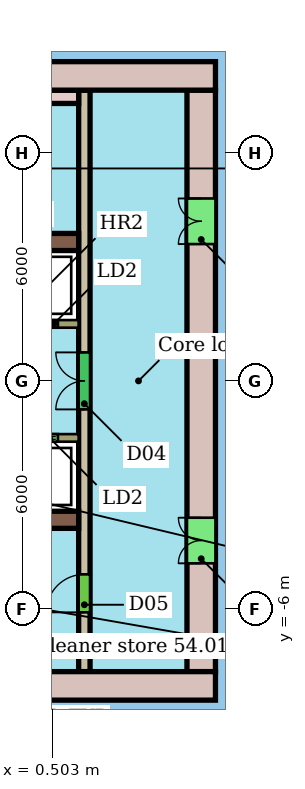
"""IFC4 building model, lengths in metres.
Left out: names, types, materials, properties, quantities, classifications, styles, units other than length and angle.
Written with IfcOpenShell. Run it as: python <this file> out.ifc"""

import sys

from ifc_helpers import new_model, si_unit, direction, frame, frame_2d, origin, place, context, subcontext, project, spatial, rectangle, extrude, element, fill, save


model = new_model("IFC4")
c1 = context("Model", 3, precision=1e-05, world=origin(), true_north=direction((0.0, 1.0)))
c2 = subcontext(c1, "Body", "Model", "MODEL_VIEW")
j1 = project(units=[si_unit("LENGTHUNIT", "METRE"), si_unit("PLANEANGLEUNIT", "RADIAN")], contexts=[c1])
p1 = place(None, origin())
s1 = spatial("IfcSite", under=j1, at=p1, CompositionType="ELEMENT")
p2 = place(p1, origin())
s2 = spatial("IfcBuilding", under=s1, at=p2, CompositionType="ELEMENT")
p3 = place(p2, frame((0.0, 0.0, 220.9)))
s3 = spatial("IfcBuildingStorey", under=s2, at=p3, CompositionType="ELEMENT", Elevation=220.9)
p4 = place(p3, frame((4.8, 8.025, 0.0), z_axis=(0.0, 0.0, 1.0), x_axis=(-1.0, 0.0, 0.0)))
e1 = element("IfcWall", 1, at=p4, inside=s3, PredefinedType="SHEAR", context=c2, shape_type="SweptSolid", body=[
    extrude(rectangle(XDim=10.8, YDim=0.75, at=frame_2d((5.4, 0.0))), origin(), (0.0, 0.0, 1.0), 3.3),
])
p5 = place(p4, frame((4.4, 0.0, 0.0)))
e2 = element("IfcOpeningElement", 2, at=p5, cuts=e1, PredefinedType="OPENING", context=c2, shape_type="SweptSolid", body=[
    extrude(rectangle(XDim=1.2, YDim=2.1, at=frame_2d((0.6, 1.05))), frame((0.0, 0.385, 0.0), z_axis=(0.0, -1.0, 0.0), x_axis=(1.0, 0.0, 0.0)), (0.0, 0.0, 1.0), 0.77),
])
p6 = place(p3, frame((-16.8, -8.025, 0.0), z_axis=(0.0, 0.0, 1.0), x_axis=(1.0, 0.0, 0.0)))
e3 = element("IfcWall", 3, at=p6, inside=s3, PredefinedType="SHEAR", context=c2, shape_type="SweptSolid", body=[
    extrude(rectangle(XDim=21.6, YDim=0.75, at=frame_2d((10.8, 0.0))), origin(), (0.0, 0.0, 1.0), 3.3),
])
p7 = place(p6, frame((4.8, 0.0, 0.0)))
e4 = element("IfcOpeningElement", 4, at=p7, cuts=e3, PredefinedType="OPENING", context=c2, shape_type="SweptSolid", body=[
    extrude(rectangle(XDim=1.2, YDim=2.1, at=frame_2d((0.6, 1.05))), frame((0.0, 0.385, 0.0), z_axis=(0.0, -1.0, 0.0), x_axis=(1.0, 0.0, 0.0)), (0.0, 0.0, 1.0), 0.77),
])
p8 = place(p3, frame((4.425, -7.65, 0.0), z_axis=(0.0, 0.0, 1.0), x_axis=(0.0, 1.0, 0.0)))
e5 = element("IfcWall", 5, at=p8, inside=s3, PredefinedType="SHEAR", context=c2, shape_type="SweptSolid", body=[
    extrude(rectangle(XDim=15.3, YDim=0.75, at=frame_2d((7.65, 0.0))), origin(), (0.0, 0.0, 1.0), 3.3),
])
p9 = place(p8, frame((2.85, 0.0, 0.0)))
e6 = element("IfcOpeningElement", 6, at=p9, cuts=e5, PredefinedType="OPENING", context=c2, shape_type="SweptSolid", body=[
    extrude(rectangle(XDim=1.2, YDim=2.1, at=frame_2d((0.6, 1.05))), frame((0.0, 0.385, 0.0), z_axis=(0.0, -1.0, 0.0), x_axis=(1.0, 0.0, 0.0)), (0.0, 0.0, 1.0), 0.77),
])
p10 = place(p8, frame((11.25, 0.0, 0.0)))
e7 = element("IfcOpeningElement", 7, at=p10, cuts=e5, PredefinedType="OPENING", context=c2, shape_type="SweptSolid", body=[
    extrude(rectangle(XDim=1.2, YDim=2.1, at=frame_2d((0.6, 1.05))), frame((0.0, 0.385, 0.0), z_axis=(0.0, -1.0, 0.0), x_axis=(1.0, 0.0, 0.0)), (0.0, 0.0, 1.0), 0.77),
])
for number, where, z_axis, x_axis in (
    (8, (-6.0, 3.655, 0.0), (0.0, 0.0, 1.0), (1.0, 0.0, 0.0)),
    (9, (-6.0, -3.655, 0.0), (0.0, 0.0, 1.0), (1.0, 0.0, 0.0)),
):
    element("IfcWall", number, at=place(p3, frame(where, z_axis=z_axis, x_axis=x_axis)), inside=s3, PredefinedType="SHEAR", context=c2, shape_type="SweptSolid", body=[
        extrude(rectangle(XDim=7.2, YDim=0.45, at=frame_2d((3.6, 0.0))), origin(), (0.0, 0.0, 1.0), 3.3),
    ])
p11 = place(p3, frame((1.35, -7.65, 0.0), z_axis=(0.0, 0.0, 1.0), x_axis=(0.0, 1.0, 0.0)))
e10 = element("IfcWall", 10, at=p11, inside=s3, PredefinedType="SHEAR", context=c2, shape_type="SweptSolid", body=[
    extrude(rectangle(XDim=15.3, YDim=0.3, at=frame_2d((7.65, 0.0))), origin(), (0.0, 0.0, 1.0), 3.3),
])
p12 = place(p11, frame((1.56, 0.0, 0.0)))
e11 = element("IfcOpeningElement", 11, at=p12, cuts=e10, PredefinedType="OPENING", context=c2, shape_type="SweptSolid", body=[
    extrude(rectangle(XDim=1.0, YDim=2.1, at=frame_2d((0.5, 1.05))), frame((0.0, 0.16, 0.0), z_axis=(0.0, -1.0, 0.0), x_axis=(1.0, 0.0, 0.0)), (0.0, 0.0, 1.0), 0.32),
])
p13 = place(p11, frame((6.9, 0.0, 0.0)))
e12 = element("IfcOpeningElement", 12, at=p13, cuts=e10, PredefinedType="OPENING", context=c2, shape_type="SweptSolid", body=[
    extrude(rectangle(XDim=1.5, YDim=2.1, at=frame_2d((0.75, 1.05))), frame((0.0, 0.16, 0.0), z_axis=(0.0, -1.0, 0.0), x_axis=(1.0, 0.0, 0.0)), (0.0, 0.0, 1.0), 0.32),
])
p14 = place(p3, frame((-13.2, 1.5, 0.0), z_axis=(0.0, 0.0, 1.0), x_axis=(1.0, 0.0, 0.0)))
e13 = element("IfcWall", 13, at=p14, inside=s3, PredefinedType="SHEAR", context=c2, shape_type="SweptSolid", body=[
    extrude(rectangle(XDim=14.4, YDim=0.2, at=frame_2d((7.2, 0.0))), origin(), (0.0, 0.0, 1.0), 3.3),
])
p15 = place(p14, frame((10.312, 0.0, 0.0)))
e14 = element("IfcOpeningElement", 14, at=p15, cuts=e13, PredefinedType="OPENING", context=c2, shape_type="SweptSolid", body=[
    extrude(rectangle(XDim=1.1, YDim=2.1, at=frame_2d((0.55, 1.05))), frame((0.0, 0.11, 0.0), z_axis=(0.0, -1.0, 0.0), x_axis=(1.0, 0.0, 0.0)), (0.0, 0.0, 1.0), 0.22),
])
p16 = place(p14, frame((12.754, 0.0, 0.0)))
e15 = element("IfcOpeningElement", 15, at=p16, cuts=e13, PredefinedType="OPENING", context=c2, shape_type="SweptSolid", body=[
    extrude(rectangle(XDim=1.1, YDim=2.1, at=frame_2d((0.55, 1.05))), frame((0.0, 0.11, 0.0), z_axis=(0.0, -1.0, 0.0), x_axis=(1.0, 0.0, 0.0)), (0.0, 0.0, 1.0), 0.22),
])
p17 = place(p14, frame((0.15, 0.0, 0.0)))
e16 = element("IfcOpeningElement", 16, at=p17, cuts=e13, PredefinedType="OPENING", context=c2, shape_type="SweptSolid", body=[
    extrude(rectangle(XDim=0.9, YDim=2.1, at=frame_2d((0.45, 1.05))), frame((0.0, 0.11, 0.0), z_axis=(0.0, -1.0, 0.0), x_axis=(1.0, 0.0, 0.0)), (0.0, 0.0, 1.0), 0.22),
])
p18 = place(p14, frame((4.222, 0.0, 0.0)))
e17 = element("IfcOpeningElement", 17, at=p18, cuts=e13, PredefinedType="OPENING", context=c2, shape_type="SweptSolid", body=[
    extrude(rectangle(XDim=0.9, YDim=2.1, at=frame_2d((0.45, 1.05))), frame((0.0, 0.11, 0.0), z_axis=(0.0, -1.0, 0.0), x_axis=(1.0, 0.0, 0.0)), (0.0, 0.0, 1.0), 0.22),
])
p19 = place(p14, frame((8.367, 0.0, 0.0)))
e18 = element("IfcOpeningElement", 18, at=p19, cuts=e13, PredefinedType="OPENING", context=c2, shape_type="SweptSolid", body=[
    extrude(rectangle(XDim=1.0, YDim=2.1, at=frame_2d((0.5, 1.05))), frame((0.0, 0.11, 0.0), z_axis=(0.0, -1.0, 0.0), x_axis=(1.0, 0.0, 0.0)), (0.0, 0.0, 1.0), 0.22),
])
p20 = place(p3, frame((1.2, -1.5, 0.0), z_axis=(0.0, 0.0, 1.0), x_axis=(-1.0, 0.0, 0.0)))
e19 = element("IfcWall", 19, at=p20, inside=s3, PredefinedType="SHEAR", context=c2, shape_type="SweptSolid", body=[
    extrude(rectangle(XDim=14.4, YDim=0.2, at=frame_2d((7.2, 0.0))), origin(), (0.0, 0.0, 1.0), 3.3),
])
p21 = place(p20, frame((7.821, 0.0, 0.0)))
e20 = element("IfcOpeningElement", 20, at=p21, cuts=e19, PredefinedType="OPENING", context=c2, shape_type="SweptSolid", body=[
    extrude(rectangle(XDim=1.2, YDim=2.1, at=frame_2d((0.6, 1.05))), frame((0.0, 0.11, 0.0), z_axis=(0.0, -1.0, 0.0), x_axis=(1.0, 0.0, 0.0)), (0.0, 0.0, 1.0), 0.22),
])
p22 = place(p20, frame((0.546, 0.0, 0.0)))
e21 = element("IfcOpeningElement", 21, at=p22, cuts=e19, PredefinedType="OPENING", context=c2, shape_type="SweptSolid", body=[
    extrude(rectangle(XDim=1.1, YDim=2.1, at=frame_2d((0.55, 1.05))), frame((0.0, 0.11, 0.0), z_axis=(0.0, -1.0, 0.0), x_axis=(1.0, 0.0, 0.0)), (0.0, 0.0, 1.0), 0.22),
])
p23 = place(p20, frame((5.632, 0.0, 0.0)))
e22 = element("IfcOpeningElement", 22, at=p23, cuts=e19, PredefinedType="OPENING", context=c2, shape_type="SweptSolid", body=[
    extrude(rectangle(XDim=1.0, YDim=2.1, at=frame_2d((0.5, 1.05))), frame((0.0, 0.11, 0.0), z_axis=(0.0, -1.0, 0.0), x_axis=(1.0, 0.0, 0.0)), (0.0, 0.0, 1.0), 0.22),
])
p24 = place(p20, frame((2.592, 0.0, 0.0)))
e23 = element("IfcOpeningElement", 23, at=p24, cuts=e19, PredefinedType="OPENING", context=c2, shape_type="SweptSolid", body=[
    extrude(rectangle(XDim=1.0, YDim=2.1, at=frame_2d((0.5, 1.05))), frame((0.0, 0.11, 0.0), z_axis=(0.0, -1.0, 0.0), x_axis=(1.0, 0.0, 0.0)), (0.0, 0.0, 1.0), 0.22),
])
p25 = place(p3, frame((0.4, 7.475, 0.0), z_axis=(0.0, 0.0, 1.0), x_axis=(1.0, 0.0, 0.0)))
e24 = element("IfcWall", 24, at=p25, inside=s3, PredefinedType="SHEAR", context=c2, shape_type="SweptSolid", body=[
    extrude(rectangle(XDim=0.8, YDim=0.35, at=frame_2d((0.4, 0.0))), origin(), (0.0, 0.0, 1.0), 3.3),
])
p26 = place(p9, origin())
e25 = element("IfcDoor", 25, at=p26, inside=s3, OperationType="DOUBLE_DOOR_SINGLE_SWING", PredefinedType="NOTDEFINED", context=c2, shape_type="SweptSolid", body=[
    extrude(rectangle(XDim=1.2, YDim=2.1, at=frame_2d((0.6, 1.05))), frame((0.0, 0.025, 0.0), z_axis=(0.0, -1.0, 0.0), x_axis=(1.0, 0.0, 0.0)), (0.0, 0.0, 1.0), 0.05),
])
fill(e6, e25)
p27 = place(p10, origin())
e26 = element("IfcDoor", 26, at=p27, inside=s3, OperationType="DOUBLE_DOOR_SINGLE_SWING", PredefinedType="NOTDEFINED", context=c2, shape_type="SweptSolid", body=[
    extrude(rectangle(XDim=1.2, YDim=2.1, at=frame_2d((0.6, 1.05))), frame((0.0, 0.025, 0.0), z_axis=(0.0, -1.0, 0.0), x_axis=(1.0, 0.0, 0.0)), (0.0, 0.0, 1.0), 0.05),
])
fill(e7, e26)
p28 = place(p12, origin())
e27 = element("IfcDoor", 27, at=p28, inside=s3, OperationType="SINGLE_SWING_LEFT", PredefinedType="NOTDEFINED", context=c2, shape_type="SweptSolid", body=[
    extrude(rectangle(XDim=1.0, YDim=2.1, at=frame_2d((0.5, 1.05))), frame((0.0, 0.025, 0.0), z_axis=(0.0, -1.0, 0.0), x_axis=(1.0, 0.0, 0.0)), (0.0, 0.0, 1.0), 0.05),
])
fill(e11, e27)
p29 = place(p13, origin())
e28 = element("IfcDoor", 28, at=p29, inside=s3, OperationType="DOUBLE_DOOR_SINGLE_SWING", PredefinedType="NOTDEFINED", context=c2, shape_type="SweptSolid", body=[
    extrude(rectangle(XDim=1.5, YDim=2.1, at=frame_2d((0.75, 1.05))), frame((0.0, 0.025, 0.0), z_axis=(0.0, -1.0, 0.0), x_axis=(1.0, 0.0, 0.0)), (0.0, 0.0, 1.0), 0.05),
])
fill(e12, e28)
p30 = place(p16, origin())
e29 = element("IfcDoor", 29, at=p30, inside=s3, OperationType="DOUBLE_DOOR_SLIDING", PredefinedType="NOTDEFINED", context=c2, shape_type="SweptSolid", body=[
    extrude(rectangle(XDim=1.1, YDim=2.1, at=frame_2d((0.55, 1.05))), frame((0.0, 0.025, 0.0), z_axis=(0.0, -1.0, 0.0), x_axis=(1.0, 0.0, 0.0)), (0.0, 0.0, 1.0), 0.05),
])
fill(e15, e29)
p31 = place(p22, origin())
e30 = element("IfcDoor", 30, at=p31, inside=s3, OperationType="DOUBLE_DOOR_SLIDING", PredefinedType="NOTDEFINED", context=c2, shape_type="SweptSolid", body=[
    extrude(rectangle(XDim=1.1, YDim=2.1, at=frame_2d((0.55, 1.05))), frame((0.0, 0.025, 0.0), z_axis=(0.0, -1.0, 0.0), x_axis=(1.0, 0.0, 0.0)), (0.0, 0.0, 1.0), 0.05),
])
fill(e21, e30)
save(model, sys.argv[1])
